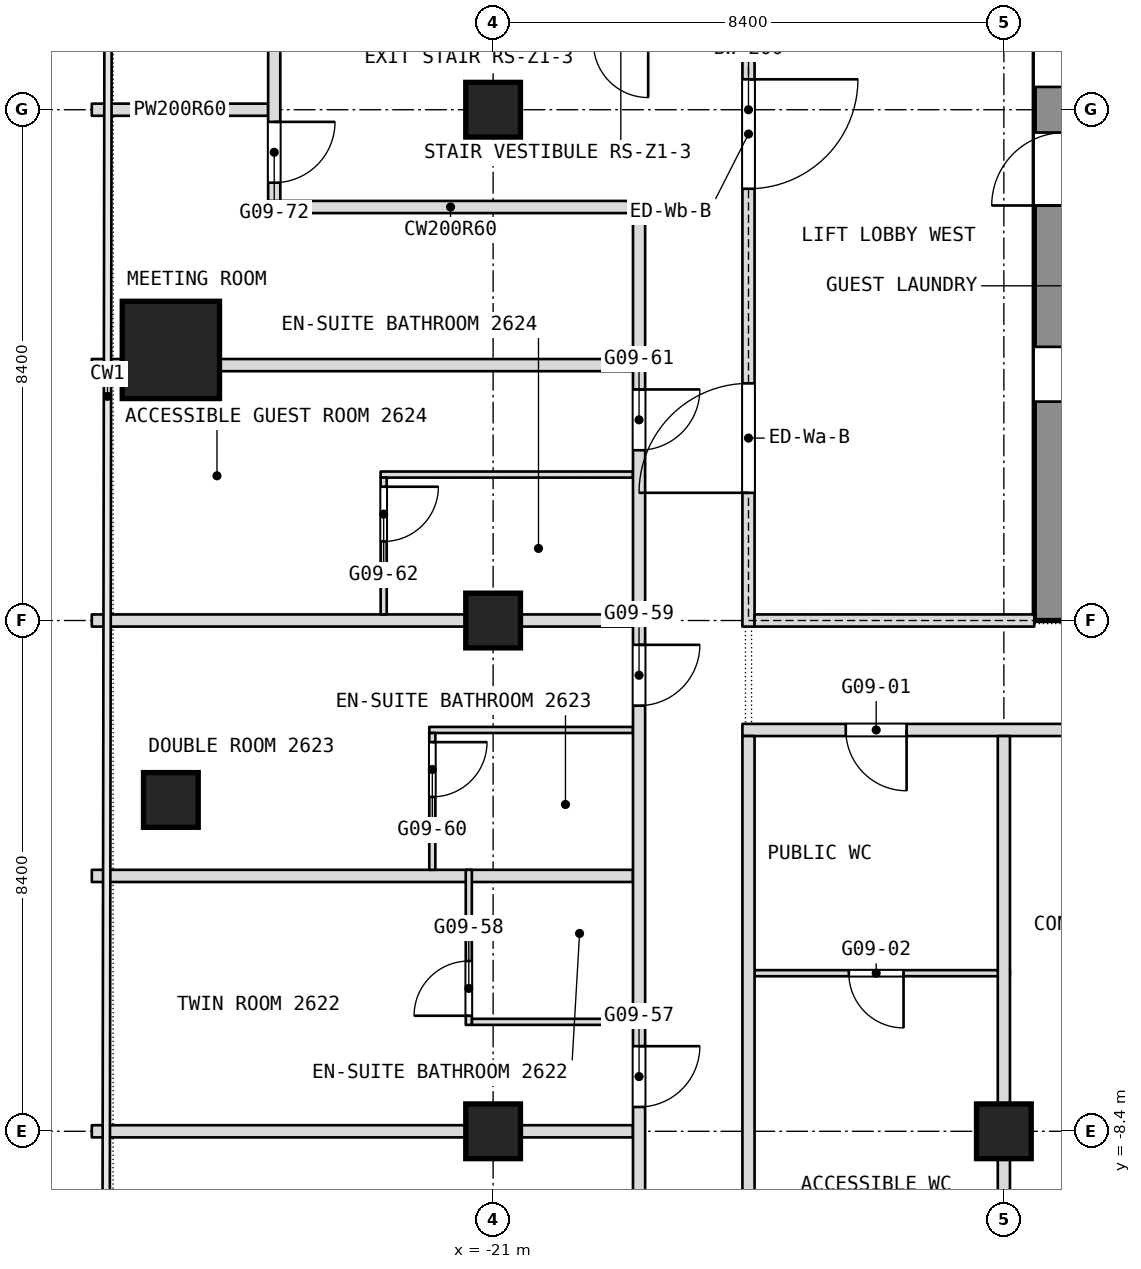
"""IFC4 building model, lengths in metres.
Left out: names, types, materials, properties, quantities, classifications, styles, units other than length and angle.
Written with IfcOpenShell. Run it as: python <this file> out.ifc"""

import sys

from ifc_helpers import new_model, si_unit, direction, frame, frame_2d, origin, origin_2d, place, context, subcontext, project, spatial, rectangle, extrude, element, fill, save


model = new_model("IFC4")
c1 = context("Model", 3, precision=1e-05, world=origin(), true_north=direction((0.0, 1.0)))
c2 = subcontext(c1, "Body", "Model", "MODEL_VIEW")
j1 = project(units=[si_unit("LENGTHUNIT", "METRE"), si_unit("PLANEANGLEUNIT", "RADIAN")], contexts=[c1])
p1 = place(None, origin())
s1 = spatial("IfcSite", under=j1, at=p1, CompositionType="ELEMENT")
p2 = place(p1, origin())
s2 = spatial("IfcBuilding", under=s1, at=p2, CompositionType="ELEMENT")
p3 = place(p2, frame((0.0, 0.0, 119.3)))
s3 = spatial("IfcBuildingStorey", under=s2, at=p3, CompositionType="ELEMENT", Elevation=119.3)
p4 = place(p3, frame((-11.6, 0.0, 0.0), z_axis=(0.0, 0.0, 1.0), x_axis=(0.0, 1.0, 0.0)))
e1 = element("IfcWall", 1, at=p4, inside=s3, PredefinedType="SHEAR", context=c2, shape_type="SweptSolid", body=[
    extrude(rectangle(XDim=16.8, YDim=1.0, at=frame_2d((8.4, 0.0))), origin(), (0.0, 0.0, 1.0), 3.6),
])
p5 = place(p4, frame((3.6, 0.0, 0.0)))
e2 = element("IfcOpeningElement", 2, at=p5, cuts=e1, PredefinedType="OPENING", context=c2, shape_type="SweptSolid", body=[
    extrude(rectangle(XDim=0.9, YDim=2.1, at=frame_2d((0.45, 1.05))), frame((0.0, 0.5, 0.0), z_axis=(0.0, -1.0, 0.0), x_axis=(1.0, 0.0, 0.0)), (0.0, 0.0, 1.0), 1.0),
])
p6 = place(p4, frame((6.825, 0.0, 0.0)))
e3 = element("IfcOpeningElement", 3, at=p6, cuts=e1, PredefinedType="OPENING", context=c2, shape_type="SweptSolid", body=[
    extrude(rectangle(XDim=1.2, YDim=2.1, at=frame_2d((0.6, 1.05))), frame((0.0, 0.5, 0.0), z_axis=(0.0, -1.0, 0.0), x_axis=(1.0, 0.0, 0.0)), (0.0, 0.0, 1.0), 1.0),
])
p7 = place(p4, frame((14.137, 0.0, 0.0)))
e4 = element("IfcOpeningElement", 4, at=p7, cuts=e1, PredefinedType="OPENING", context=c2, shape_type="SweptSolid", body=[
    extrude(rectangle(XDim=0.9, YDim=2.1, at=frame_2d((0.45, 1.05))), frame((0.0, 0.5, 0.0), z_axis=(0.0, -1.0, 0.0), x_axis=(1.0, 0.0, 0.0)), (0.0, 0.0, 1.0), 1.0),
])
p8 = place(p4, frame((11.512, 0.0, 0.0)))
e5 = element("IfcOpeningElement", 5, at=p8, cuts=e1, PredefinedType="OPENING", context=c2, shape_type="SweptSolid", body=[
    extrude(rectangle(XDim=0.9, YDim=2.1, at=frame_2d((0.45, 1.05))), frame((0.0, 0.5, 0.0), z_axis=(0.0, -1.0, 0.0), x_axis=(1.0, 0.0, 0.0)), (0.0, 0.0, 1.0), 1.0),
])
p9 = place(p4, frame((8.775, 0.0, 0.0)))
e6 = element("IfcOpeningElement", 6, at=p9, cuts=e1, PredefinedType="OPENING", context=c2, shape_type="SweptSolid", body=[
    extrude(rectangle(XDim=1.2, YDim=2.1, at=frame_2d((0.6, 1.05))), frame((0.0, 0.5, 0.0), z_axis=(0.0, -1.0, 0.0), x_axis=(1.0, 0.0, 0.0)), (0.0, 0.0, 1.0), 1.0),
])
p10 = place(p3, frame((-26.3, 4.45, 0.0), z_axis=(0.0, 0.0, 1.0), x_axis=(1.0, 0.0, 0.0)))
e7 = element("IfcColumn", 7, at=p10, inside=s3, PredefinedType="COLUMN", context=c2, shape_type="SweptSolid", body=[
    extrude(rectangle(XDim=1.6, YDim=1.6, at=origin_2d()), origin(), (0.0, 0.0, 1.0), 3.6),
])
for number, where, z_axis, x_axis in (
    (8, (-21.0, -8.4, 0.0), (0.0, 0.0, 1.0), (1.0, 0.0, 0.0)),
    (9, (-21.0, 0.0, 0.0), (0.0, 0.0, 1.0), (1.0, 0.0, 0.0)),
    (10, (-21.0, 8.4, 0.0), (0.0, 0.0, 1.0), (1.0, 0.0, 0.0)),
    (11, (-12.6, -8.4, 0.0), (0.0, 0.0, 1.0), (1.0, 0.0, 0.0)),
    (12, (-26.3, -2.951, 0.0), (0.0, 0.0, 1.0), (1.0, 0.0, 0.0)),
):
    element("IfcColumn", number, at=place(p3, frame(where, z_axis=z_axis, x_axis=x_axis)), inside=s3, PredefinedType="COLUMN", context=c2, shape_type="SweptSolid", body=[
        extrude(rectangle(XDim=0.9, YDim=0.9, at=origin_2d()), origin(), (0.0, 0.0, 1.0), 3.6),
    ])
p11 = place(p3, frame((-27.6, -8.4, 0.0), z_axis=(0.0, 0.0, 1.0), x_axis=(1.0, 0.0, 0.0)))
e13 = element("IfcWall", 13, at=p11, inside=s3, PredefinedType="PARTITIONING", context=c2, shape_type="SweptSolid", body=[
    extrude(rectangle(XDim=8.9, YDim=0.2, at=frame_2d((4.45, 0.0))), origin(), (0.0, 0.0, 1.0), 2.89),
])
p12 = place(p3, frame((-21.35, -6.6, 0.0), z_axis=(0.0, 0.0, 1.0), x_axis=(1.0, 0.0, 0.0)))
e14 = element("IfcWall", 14, at=p12, inside=s3, PredefinedType="PARTITIONING", context=c2, shape_type="SweptSolid", body=[
    extrude(rectangle(XDim=2.65, YDim=0.1, at=frame_2d((1.325, 0.0))), origin(), (0.0, 0.0, 1.0), 3.34),
])
p13 = place(p3, frame((-16.7, -5.8, 0.0), z_axis=(0.0, 0.0, 1.0), x_axis=(1.0, 0.0, 0.0)))
e15 = element("IfcWall", 15, at=p13, inside=s3, PredefinedType="PARTITIONING", context=c2, shape_type="SweptSolid", body=[
    extrude(rectangle(XDim=4.2, YDim=0.1, at=frame_2d((2.1, 0.0))), origin(), (0.0, 0.0, 1.0), 3.34),
])
p14 = place(p13, frame((1.55, 0.0, 0.0)))
e16 = element("IfcOpeningElement", 16, at=p14, cuts=e15, PredefinedType="OPENING", context=c2, shape_type="SweptSolid", body=[
    extrude(rectangle(XDim=0.9, YDim=2.1, at=frame_2d((0.45, 1.05))), frame((0.0, 0.05, 0.0), z_axis=(0.0, -1.0, 0.0), x_axis=(1.0, 0.0, 0.0)), (0.0, 0.0, 1.0), 0.1),
])
p15 = place(p3, frame((-27.6, -4.2, 0.0), z_axis=(0.0, 0.0, 1.0), x_axis=(1.0, 0.0, 0.0)))
e17 = element("IfcWall", 17, at=p15, inside=s3, PredefinedType="PARTITIONING", context=c2, shape_type="SweptSolid", body=[
    extrude(rectangle(XDim=8.9, YDim=0.2, at=frame_2d((4.45, 0.0))), origin(), (0.0, 0.0, 1.0), 3.34),
])
p16 = place(p3, frame((-22.05, -1.8, 0.0), z_axis=(0.0, 0.0, 1.0), x_axis=(1.0, 0.0, 0.0)))
e18 = element("IfcWall", 18, at=p16, inside=s3, PredefinedType="PARTITIONING", context=c2, shape_type="SweptSolid", body=[
    extrude(rectangle(XDim=3.35, YDim=0.1, at=frame_2d((1.675, 0.0))), origin(), (0.0, 0.0, 1.0), 3.34),
])
p17 = place(p3, frame((-16.9, -1.8, 0.0), z_axis=(0.0, 0.0, 1.0), x_axis=(1.0, 0.0, 0.0)))
e19 = element("IfcWall", 19, at=p17, inside=s3, PredefinedType="PARTITIONING", context=c2, shape_type="SweptSolid", body=[
    extrude(rectangle(XDim=8.2, YDim=0.2, at=frame_2d((4.1, 0.0))), origin(), (0.0, 0.0, 1.0), 3.34),
])
p18 = place(p17, frame((1.7, 0.0, 0.0)))
e20 = element("IfcOpeningElement", 20, at=p18, cuts=e19, PredefinedType="OPENING", context=c2, shape_type="SweptSolid", body=[
    extrude(rectangle(XDim=1.0, YDim=2.1, at=frame_2d((0.5, 1.05))), frame((0.0, 0.1, 0.0), z_axis=(0.0, -1.0, 0.0), x_axis=(1.0, 0.0, 0.0)), (0.0, 0.0, 1.0), 0.2),
])
p19 = place(p17, frame((5.8, 0.0, 0.0)))
e21 = element("IfcOpeningElement", 21, at=p19, cuts=e19, PredefinedType="OPENING", context=c2, shape_type="SweptSolid", body=[
    extrude(rectangle(XDim=1.0, YDim=2.1, at=frame_2d((0.5, 1.05))), frame((0.0, 0.1, 0.0), z_axis=(0.0, -1.0, 0.0), x_axis=(1.0, 0.0, 0.0)), (0.0, 0.0, 1.0), 0.2),
])
p20 = place(p3, frame((-27.6, 0.0, 0.0), z_axis=(0.0, 0.0, 1.0), x_axis=(1.0, 0.0, 0.0)))
e22 = element("IfcWall", 22, at=p20, inside=s3, PredefinedType="PARTITIONING", context=c2, shape_type="SweptSolid", body=[
    extrude(rectangle(XDim=8.9, YDim=0.2, at=frame_2d((4.45, 0.0))), origin(), (0.0, 0.0, 1.0), 2.89),
])
p21 = place(p3, frame((-22.85, 2.4, 0.0), z_axis=(0.0, 0.0, 1.0), x_axis=(1.0, 0.0, 0.0)))
e23 = element("IfcWall", 23, at=p21, inside=s3, PredefinedType="PARTITIONING", context=c2, shape_type="SweptSolid", body=[
    extrude(rectangle(XDim=4.15, YDim=0.1, at=frame_2d((2.075, 0.0))), origin(), (0.0, 0.0, 1.0), 3.34),
])
p22 = place(p3, frame((-27.6, 4.2, 0.0), z_axis=(0.0, 0.0, 1.0), x_axis=(1.0, 0.0, 0.0)))
e24 = element("IfcWall", 24, at=p22, inside=s3, PredefinedType="PARTITIONING", context=c2, shape_type="SweptSolid", body=[
    extrude(rectangle(XDim=0.5, YDim=0.2, at=frame_2d((0.25, 0.0))), origin(), (0.0, 0.0, 1.0), 3.34),
])
p23 = place(p3, frame((-25.5, 4.2, 0.0), z_axis=(0.0, 0.0, 1.0), x_axis=(1.0, 0.0, 0.0)))
e25 = element("IfcWall", 25, at=p23, inside=s3, PredefinedType="PARTITIONING", context=c2, shape_type="SweptSolid", body=[
    extrude(rectangle(XDim=6.8, YDim=0.2, at=frame_2d((3.4, 0.0))), origin(), (0.0, 0.0, 1.0), 3.34),
])
p24 = place(p3, frame((-24.7, 6.8, 0.0), z_axis=(0.0, 0.0, 1.0), x_axis=(1.0, 0.0, 0.0)))
e26 = element("IfcWall", 26, at=p24, inside=s3, PredefinedType="PARTITIONING", context=c2, shape_type="SweptSolid", body=[
    extrude(rectangle(XDim=6.0, YDim=0.2, at=frame_2d((3.0, 0.0))), origin(), (0.0, 0.0, 1.0), 3.34),
])
p25 = place(p3, frame((-27.6, 8.4, 0.0), z_axis=(0.0, 0.0, 1.0), x_axis=(1.0, 0.0, 0.0)))
e27 = element("IfcWall", 27, at=p25, inside=s3, PredefinedType="PARTITIONING", context=c2, shape_type="SweptSolid", body=[
    extrude(rectangle(XDim=2.9, YDim=0.2, at=frame_2d((1.45, 0.0))), origin(), (0.0, 0.0, 1.0), 2.89),
])
p26 = place(p3, frame((-12.6, -11.6, 0.0), z_axis=(0.0, 0.0, 1.0), x_axis=(0.0, 1.0, 0.0)))
e28 = element("IfcWall", 28, at=p26, inside=s3, PredefinedType="PARTITIONING", context=c2, shape_type="SweptSolid", body=[
    extrude(rectangle(XDim=9.7, YDim=0.2, at=frame_2d((4.85, 0.0))), origin(), (0.0, 0.0, 1.0), 3.34),
])
p27 = place(p3, frame((-16.8, -11.8, 0.0), z_axis=(0.0, 0.0, 1.0), x_axis=(0.0, 1.0, 0.0)))
e29 = element("IfcWall", 29, at=p27, inside=s3, PredefinedType="PARTITIONING", context=c2, shape_type="SweptSolid", body=[
    extrude(rectangle(XDim=9.9, YDim=0.2, at=frame_2d((4.95, 0.0))), origin(), (0.0, 0.0, 1.0), 3.34),
])
p28 = place(p3, frame((-18.6, -21.708, 0.0), z_axis=(0.0, 0.0, 1.0), x_axis=(0.0, 1.0, 0.0)))
e30 = element("IfcWall", 30, at=p28, inside=s3, PredefinedType="PARTITIONING", context=c2, shape_type="SweptSolid", body=[
    extrude(rectangle(XDim=28.608, YDim=0.2, at=frame_2d((14.304, 0.0))), origin(), (0.0, 0.0, 1.0), 3.34),
])
p29 = place(p28, frame((2.054, 0.0, 0.0)))
e31 = element("IfcOpeningElement", 31, at=p29, cuts=e30, PredefinedType="OPENING", context=c2, shape_type="SweptSolid", body=[
    extrude(rectangle(XDim=0.9, YDim=2.1, at=frame_2d((0.45, 1.05))), frame((0.0, 0.1, 0.0), z_axis=(0.0, -1.0, 0.0), x_axis=(1.0, 0.0, 0.0)), (0.0, 0.0, 1.0), 0.2),
])
p30 = place(p28, frame((8.208, 0.0, 0.0)))
e32 = element("IfcOpeningElement", 32, at=p30, cuts=e30, PredefinedType="OPENING", context=c2, shape_type="SweptSolid", body=[
    extrude(rectangle(XDim=1.8, YDim=2.1, at=frame_2d((0.9, 1.05))), frame((0.0, 0.1, 0.0), z_axis=(0.0, -1.0, 0.0), x_axis=(1.0, 0.0, 0.0)), (0.0, 0.0, 1.0), 0.2),
])
p31 = place(p28, frame((13.708, 0.0, 0.0)))
e33 = element("IfcOpeningElement", 33, at=p31, cuts=e30, PredefinedType="OPENING", context=c2, shape_type="SweptSolid", body=[
    extrude(rectangle(XDim=1.0, YDim=2.1, at=frame_2d((0.5, 1.05))), frame((0.0, 0.1, 0.0), z_axis=(0.0, -1.0, 0.0), x_axis=(1.0, 0.0, 0.0)), (0.0, 0.0, 1.0), 0.2),
])
p32 = place(p28, frame((20.308, 0.0, 0.0)))
e34 = element("IfcOpeningElement", 34, at=p32, cuts=e30, PredefinedType="OPENING", context=c2, shape_type="SweptSolid", body=[
    extrude(rectangle(XDim=1.0, YDim=2.1, at=frame_2d((0.5, 1.05))), frame((0.0, 0.1, 0.0), z_axis=(0.0, -1.0, 0.0), x_axis=(1.0, 0.0, 0.0)), (0.0, 0.0, 1.0), 0.2),
])
p33 = place(p28, frame((24.508, 0.0, 0.0)))
e35 = element("IfcOpeningElement", 35, at=p33, cuts=e30, PredefinedType="OPENING", context=c2, shape_type="SweptSolid", body=[
    extrude(rectangle(XDim=1.0, YDim=2.1, at=frame_2d((0.5, 1.05))), frame((0.0, 0.1, 0.0), z_axis=(0.0, -1.0, 0.0), x_axis=(1.0, 0.0, 0.0)), (0.0, 0.0, 1.0), 0.2),
])
p34 = place(p3, frame((-21.4, -6.65, 0.0), z_axis=(0.0, 0.0, 1.0), x_axis=(0.0, 1.0, 0.0)))
e36 = element("IfcWall", 36, at=p34, inside=s3, PredefinedType="PARTITIONING", context=c2, shape_type="SweptSolid", body=[
    extrude(rectangle(XDim=2.55, YDim=0.1, at=frame_2d((1.275, 0.0))), origin(), (0.0, 0.0, 1.0), 3.34),
])
p35 = place(p34, frame((0.15, 0.0, 0.0)))
e37 = element("IfcOpeningElement", 37, at=p35, cuts=e36, PredefinedType="OPENING", context=c2, shape_type="SweptSolid", body=[
    extrude(rectangle(XDim=0.9, YDim=2.1, at=frame_2d((0.45, 1.05))), frame((0.0, 0.05, 0.0), z_axis=(0.0, -1.0, 0.0), x_axis=(1.0, 0.0, 0.0)), (0.0, 0.0, 1.0), 0.1),
])
p36 = place(p3, frame((-22.0, -4.1, 0.0), z_axis=(0.0, 0.0, 1.0), x_axis=(0.0, 1.0, 0.0)))
e38 = element("IfcWall", 38, at=p36, inside=s3, PredefinedType="PARTITIONING", context=c2, shape_type="SweptSolid", body=[
    extrude(rectangle(XDim=2.25, YDim=0.1, at=frame_2d((1.125, 0.0))), origin(), (0.0, 0.0, 1.0), 3.34),
])
p37 = place(p36, frame((1.2, 0.0, 0.0)))
e39 = element("IfcOpeningElement", 39, at=p37, cuts=e38, PredefinedType="OPENING", context=c2, shape_type="SweptSolid", body=[
    extrude(rectangle(XDim=0.9, YDim=2.1, at=frame_2d((0.45, 1.05))), frame((0.0, 0.05, 0.0), z_axis=(0.0, -1.0, 0.0), x_axis=(1.0, 0.0, 0.0)), (0.0, 0.0, 1.0), 0.1),
])
p38 = place(p3, frame((-22.8, 0.1, 0.0), z_axis=(0.0, 0.0, 1.0), x_axis=(0.0, 1.0, 0.0)))
e40 = element("IfcWall", 40, at=p38, inside=s3, PredefinedType="PARTITIONING", context=c2, shape_type="SweptSolid", body=[
    extrude(rectangle(XDim=2.25, YDim=0.1, at=frame_2d((1.125, 0.0))), origin(), (0.0, 0.0, 1.0), 3.34),
])
p39 = place(p38, frame((1.2, 0.0, 0.0)))
e41 = element("IfcOpeningElement", 41, at=p39, cuts=e40, PredefinedType="OPENING", context=c2, shape_type="SweptSolid", body=[
    extrude(rectangle(XDim=0.9, YDim=2.1, at=frame_2d((0.45, 1.05))), frame((0.0, 0.05, 0.0), z_axis=(0.0, -1.0, 0.0), x_axis=(1.0, 0.0, 0.0)), (0.0, 0.0, 1.0), 0.1),
])
p40 = place(p3, frame((-24.6, 6.9, 0.0), z_axis=(0.0, 0.0, 1.0), x_axis=(0.0, 1.0, 0.0)))
e42 = element("IfcWall", 42, at=p40, inside=s3, PredefinedType="PARTITIONING", context=c2, shape_type="SweptSolid", body=[
    extrude(rectangle(XDim=11.6, YDim=0.2, at=frame_2d((5.8, 0.0))), origin(), (0.0, 0.0, 1.0), 3.34),
])
p41 = place(p40, frame((5.45, 0.0, 0.0)))
e43 = element("IfcOpeningElement", 43, at=p41, cuts=e42, PredefinedType="OPENING", context=c2, shape_type="SweptSolid", body=[
    extrude(rectangle(XDim=1.8, YDim=2.1, at=frame_2d((0.9, 1.05))), frame((0.0, 0.1, 0.0), z_axis=(0.0, -1.0, 0.0), x_axis=(1.0, 0.0, 0.0)), (0.0, 0.0, 1.0), 0.2),
])
p42 = place(p40, frame((0.3, 0.0, 0.0)))
e44 = element("IfcOpeningElement", 44, at=p42, cuts=e42, PredefinedType="OPENING", context=c2, shape_type="SweptSolid", body=[
    extrude(rectangle(XDim=1.0, YDim=2.1, at=frame_2d((0.5, 1.05))), frame((0.0, 0.1, 0.0), z_axis=(0.0, -1.0, 0.0), x_axis=(1.0, 0.0, 0.0)), (0.0, 0.0, 1.0), 0.2),
])
p43 = place(p3, frame((-16.8, -0.1, 0.0), z_axis=(0.0, 0.0, 1.0), x_axis=(0.0, 1.0, 0.0)))
e45 = element("IfcWall", 45, at=p43, inside=s3, PredefinedType="PARTITIONING", context=c2, shape_type="SweptSolid", body=[
    extrude(rectangle(XDim=17.0, YDim=0.2, at=frame_2d((8.5, 0.0))), origin(), (0.0, 0.0, 1.0), 3.34),
])
p44 = place(p43, frame((2.2, 0.0, 0.0)))
e46 = element("IfcOpeningElement", 46, at=p44, cuts=e45, PredefinedType="OPENING", context=c2, shape_type="SweptSolid", body=[
    extrude(rectangle(XDim=1.8, YDim=2.1, at=frame_2d((0.9, 1.05))), frame((0.0, 0.1, 0.0), z_axis=(0.0, -1.0, 0.0), x_axis=(1.0, 0.0, 0.0)), (0.0, 0.0, 1.0), 0.2),
])
p45 = place(p43, frame((7.2, 0.0, 0.0)))
e47 = element("IfcOpeningElement", 47, at=p45, cuts=e45, PredefinedType="OPENING", context=c2, shape_type="SweptSolid", body=[
    extrude(rectangle(XDim=1.8, YDim=2.1, at=frame_2d((0.9, 1.05))), frame((0.0, 0.1, 0.0), z_axis=(0.0, -1.0, 0.0), x_axis=(1.0, 0.0, 0.0)), (0.0, 0.0, 1.0), 0.2),
])
p46 = place(p3, frame((-16.7, 0.0, 0.0), z_axis=(0.0, 0.0, 1.0), x_axis=(1.0, 0.0, 0.0)))
e48 = element("IfcWall", 48, at=p46, inside=s3, PredefinedType="PARTITIONING", context=c2, shape_type="SweptSolid", body=[
    extrude(rectangle(XDim=4.6, YDim=0.2, at=frame_2d((2.3, 0.0))), origin(), (0.0, 0.0, 1.0), 2.89),
])
p47 = place(p14, origin())
e49 = element("IfcDoor", 49, at=p47, inside=s3, OperationType="SINGLE_SWING_RIGHT", PredefinedType="DOOR", context=c2, shape_type="SweptSolid", body=[
    extrude(rectangle(XDim=0.9, YDim=2.1, at=frame_2d((0.45, 1.05))), frame((0.0, 0.025, 0.0), z_axis=(0.0, -1.0, 0.0), x_axis=(1.0, 0.0, 0.0)), (0.0, 0.0, 1.0), 0.05),
])
fill(e16, e49)
p48 = place(p18, origin())
e50 = element("IfcDoor", 50, at=p48, inside=s3, OperationType="SINGLE_SWING_LEFT", PredefinedType="DOOR", context=c2, shape_type="SweptSolid", body=[
    extrude(rectangle(XDim=1.0, YDim=2.1, at=frame_2d((0.5, 1.05))), frame((0.0, 0.025, 0.0), z_axis=(0.0, -1.0, 0.0), x_axis=(1.0, 0.0, 0.0)), (0.0, 0.0, 1.0), 0.05),
])
fill(e20, e50)
p49 = place(p31, origin())
e51 = element("IfcDoor", 51, at=p49, inside=s3, OperationType="SINGLE_SWING_RIGHT", PredefinedType="DOOR", context=c2, shape_type="SweptSolid", body=[
    extrude(rectangle(XDim=1.0, YDim=2.1, at=frame_2d((0.5, 1.05))), frame((0.0, 0.025, 0.0), z_axis=(0.0, -1.0, 0.0), x_axis=(1.0, 0.0, 0.0)), (0.0, 0.0, 1.0), 0.05),
])
fill(e33, e51)
p50 = place(p32, origin())
e52 = element("IfcDoor", 52, at=p50, inside=s3, OperationType="SINGLE_SWING_RIGHT", PredefinedType="DOOR", context=c2, shape_type="SweptSolid", body=[
    extrude(rectangle(XDim=1.0, YDim=2.1, at=frame_2d((0.5, 1.05))), frame((0.0, 0.025, 0.0), z_axis=(0.0, -1.0, 0.0), x_axis=(1.0, 0.0, 0.0)), (0.0, 0.0, 1.0), 0.05),
])
fill(e34, e52)
p51 = place(p33, origin())
e53 = element("IfcDoor", 53, at=p51, inside=s3, OperationType="SINGLE_SWING_RIGHT", PredefinedType="DOOR", context=c2, shape_type="SweptSolid", body=[
    extrude(rectangle(XDim=1.0, YDim=2.1, at=frame_2d((0.5, 1.05))), frame((0.0, 0.025, 0.0), z_axis=(0.0, -1.0, 0.0), x_axis=(1.0, 0.0, 0.0)), (0.0, 0.0, 1.0), 0.05),
])
fill(e35, e53)
p52 = place(p35, origin())
e54 = element("IfcDoor", 54, at=p52, inside=s3, OperationType="SINGLE_SWING_RIGHT", PredefinedType="DOOR", context=c2, shape_type="SweptSolid", body=[
    extrude(rectangle(XDim=0.9, YDim=2.1, at=frame_2d((0.45, 1.05))), frame((0.0, 0.025, 0.0), z_axis=(0.0, -1.0, 0.0), x_axis=(1.0, 0.0, 0.0)), (0.0, 0.0, 1.0), 0.05),
])
fill(e37, e54)
p53 = place(p37, origin())
e55 = element("IfcDoor", 55, at=p53, inside=s3, OperationType="SINGLE_SWING_LEFT", PredefinedType="DOOR", context=c2, shape_type="SweptSolid", body=[
    extrude(rectangle(XDim=0.9, YDim=2.1, at=frame_2d((0.45, 1.05))), frame((0.0, 0.025, 0.0), z_axis=(0.0, -1.0, 0.0), x_axis=(1.0, 0.0, 0.0)), (0.0, 0.0, 1.0), 0.05),
])
fill(e39, e55)
p54 = place(p39, origin())
e56 = element("IfcDoor", 56, at=p54, inside=s3, OperationType="SINGLE_SWING_LEFT", PredefinedType="DOOR", context=c2, shape_type="SweptSolid", body=[
    extrude(rectangle(XDim=0.9, YDim=2.1, at=frame_2d((0.45, 1.05))), frame((0.0, 0.025, 0.0), z_axis=(0.0, -1.0, 0.0), x_axis=(1.0, 0.0, 0.0)), (0.0, 0.0, 1.0), 0.05),
])
fill(e41, e56)
p55 = place(p42, origin())
e57 = element("IfcDoor", 57, at=p55, inside=s3, OperationType="SINGLE_SWING_LEFT", PredefinedType="DOOR", context=c2, shape_type="SweptSolid", body=[
    extrude(rectangle(XDim=1.0, YDim=2.1, at=frame_2d((0.5, 1.05))), frame((0.0, 0.025, 0.0), z_axis=(0.0, -1.0, 0.0), x_axis=(1.0, 0.0, 0.0)), (0.0, 0.0, 1.0), 0.05),
])
fill(e44, e57)
p56 = place(p44, origin())
e58 = element("IfcDoor", 58, at=p56, inside=s3, OperationType="DOUBLE_DOOR_SINGLE_SWING", PredefinedType="DOOR", context=c2, shape_type="SweptSolid", body=[
    extrude(rectangle(XDim=1.8, YDim=2.1, at=frame_2d((0.9, 1.05))), frame((0.0, 0.025, 0.0), z_axis=(0.0, -1.0, 0.0), x_axis=(1.0, 0.0, 0.0)), (0.0, 0.0, 1.0), 0.05),
])
fill(e46, e58)
p57 = place(p45, origin())
e59 = element("IfcDoor", 59, at=p57, inside=s3, OperationType="DOUBLE_DOOR_SINGLE_SWING", PredefinedType="DOOR", context=c2, shape_type="SweptSolid", body=[
    extrude(rectangle(XDim=1.8, YDim=2.1, at=frame_2d((0.9, 1.05))), frame((0.0, 0.025, 0.0), z_axis=(0.0, -1.0, 0.0), x_axis=(1.0, 0.0, 0.0)), (0.0, 0.0, 1.0), 0.05),
])
fill(e47, e59)
save(model, sys.argv[1])
